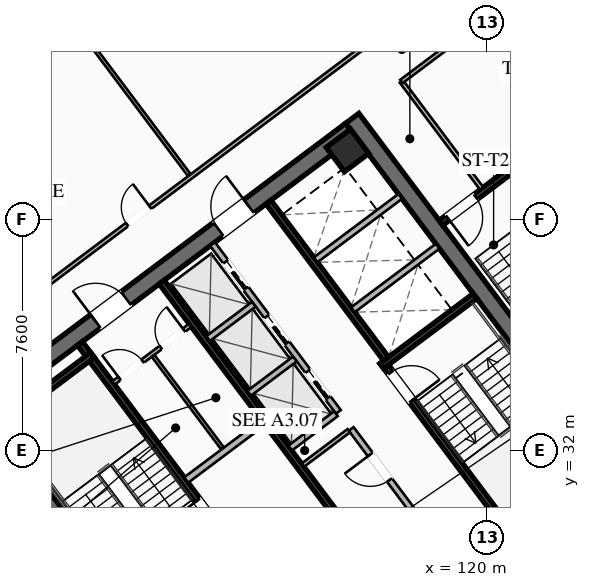
"""IFC4 building model, lengths in metres.
Left out: names, types, materials, properties, quantities, classifications, styles, units other than length and angle.
Written with IfcOpenShell. Run it as: python <this file> out.ifc"""

import sys

from ifc_helpers import new_model, si_unit, direction, frame, frame_2d, origin, origin_2d, place, context, subcontext, project, spatial, rectangle, hollow_rectangle, extrude, element, fill, save


model = new_model("IFC4")
c1 = context("Model", 3, precision=1e-05, world=origin(), true_north=direction((0.0, 1.0)))
c2 = subcontext(c1, "Body", "Model", "MODEL_VIEW")
j1 = project(units=[si_unit("LENGTHUNIT", "METRE"), si_unit("PLANEANGLEUNIT", "RADIAN")], contexts=[c1])
p1 = place(None, origin())
s1 = spatial("IfcSite", under=j1, at=p1, CompositionType="ELEMENT")
p2 = place(p1, origin())
s2 = spatial("IfcBuilding", under=s1, at=p2, CompositionType="ELEMENT")
p3 = place(p2, frame((0.0, 0.0, 125.05)))
s3 = spatial("IfcBuildingStorey", under=s2, at=p3, CompositionType="ELEMENT", Elevation=125.05)
for number, where, z_axis, x_axis in (
    (1, (112.436, 21.077, 0.0), (0.0, 0.0, 1.0), (-0.6, 0.8, 0.0)),
    (2, (115.564, 42.923, 0.0), (0.0, 0.0, 1.0), (0.6, -0.8, 0.0)),
):
    element("IfcWall", number, at=place(p3, frame(where, z_axis=z_axis, x_axis=x_axis)), inside=s3, PredefinedType="SHEAR", context=c2, shape_type="SweptSolid", body=[
        extrude(rectangle(XDim=15.6, YDim=0.55, at=frame_2d((7.8, 0.0))), origin(), (0.0, 0.0, 1.0), 3.55),
    ])
p4 = place(p3, frame((124.539, 30.498, 0.0), z_axis=(0.0, 0.0, 1.0), x_axis=(-0.799998054672, -0.600002593761, 0.0)))
e3 = element("IfcWall", 3, at=p4, inside=s3, PredefinedType="SHEAR", context=c2, shape_type="SweptSolid", body=[
    extrude(rectangle(XDim=15.06, YDim=0.55, at=frame_2d((7.53, 0.0))), origin(), (0.0, 0.0, 1.0), 3.55),
])
p5 = place(p4, frame((9.23, 0.0, 0.0)))
e4 = element("IfcOpeningElement", 4, at=p5, cuts=e3, PredefinedType="OPENING", context=c2, shape_type="SweptSolid", body=[
    extrude(rectangle(XDim=1.25, YDim=2.25, at=frame_2d((0.625, 1.125))), frame((0.0, 0.285, 0.0), z_axis=(0.0, -1.0, 0.0), x_axis=(1.0, 0.0, 0.0)), (0.0, 0.0, 1.0), 0.57),
])
p6 = place(p4, frame((4.18, 0.0, 0.0)))
e5 = element("IfcOpeningElement", 5, at=p6, cuts=e3, PredefinedType="OPENING", context=c2, shape_type="SweptSolid", body=[
    extrude(rectangle(XDim=1.25, YDim=2.25, at=frame_2d((0.625, 1.125))), frame((0.0, 0.285, 0.0), z_axis=(0.0, -1.0, 0.0), x_axis=(1.0, 0.0, 0.0)), (0.0, 0.0, 1.0), 0.57),
])
p7 = place(p3, frame((103.461, 33.502, 0.0), z_axis=(0.0, 0.0, 1.0), x_axis=(0.799998054672, 0.600002593761, 0.0)))
e6 = element("IfcWall", 6, at=p7, inside=s3, PredefinedType="SHEAR", context=c2, shape_type="SweptSolid", body=[
    extrude(rectangle(XDim=15.06, YDim=0.55, at=frame_2d((7.53, 0.0))), origin(), (0.0, 0.0, 1.0), 3.55),
])
p8 = place(p7, frame((4.58, 0.0, 0.0)))
e7 = element("IfcOpeningElement", 7, at=p8, cuts=e6, PredefinedType="OPENING", context=c2, shape_type="SweptSolid", body=[
    extrude(rectangle(XDim=1.25, YDim=2.25, at=frame_2d((0.625, 1.125))), frame((0.0, 0.285, 0.0), z_axis=(0.0, -1.0, 0.0), x_axis=(1.0, 0.0, 0.0)), (0.0, 0.0, 1.0), 0.57),
])
p9 = place(p7, frame((9.63, 0.0, 0.0)))
e8 = element("IfcOpeningElement", 8, at=p9, cuts=e6, PredefinedType="OPENING", context=c2, shape_type="SweptSolid", body=[
    extrude(rectangle(XDim=1.25, YDim=2.25, at=frame_2d((0.625, 1.125))), frame((0.0, 0.285, 0.0), z_axis=(0.0, -1.0, 0.0), x_axis=(1.0, 0.0, 0.0)), (0.0, 0.0, 1.0), 0.57),
])
p10 = place(p3, frame((115.41, 41.87, 0.0), z_axis=(0.0, 0.0, 1.0), x_axis=(0.799999996291, 0.600000004945, 0.0)))
e9 = element("IfcColumn", 9, at=p10, inside=s3, PredefinedType="COLUMN", context=c2, shape_type="SweptSolid", body=[
    extrude(hollow_rectangle(XDim=1.0, YDim=1.0, WallThickness=0.04, at=origin_2d()), origin(), (0.0, 0.0, 1.0), 3.37),
])
p11 = place(p3, frame((99.632, 44.074, 0.0), z_axis=(0.0, 0.0, 1.0), x_axis=(0.799986212866, 0.600018382406, 0.0)))
e10 = element("IfcWall", 10, at=p11, inside=s3, PredefinedType="SOLIDWALL", context=c2, shape_type="SweptSolid", body=[
    extrude(rectangle(XDim=8.5, YDim=0.28, at=frame_2d((4.25, 0.0))), origin(), (0.0, 0.0, 1.0), 3.37),
])
p12 = place(p11, frame((3.6, 0.0, 0.0)))
e11 = element("IfcOpeningElement", 11, at=p12, cuts=e10, PredefinedType="OPENING", context=c2, shape_type="SweptSolid", body=[
    extrude(rectangle(XDim=1.3, YDim=2.15, at=frame_2d((0.65, 1.075))), frame((0.0, 0.15, 0.0), z_axis=(0.0, -1.0, 0.0), x_axis=(1.0, 0.0, 0.0)), (0.0, 0.0, 1.0), 0.3),
])
p13 = place(p3, frame((111.44, 29.08, 0.0), z_axis=(0.0, 0.0, 1.0), x_axis=(-0.59999029481, 0.8000072788, 0.0)))
e12 = element("IfcWall", 12, at=p13, inside=s3, PredefinedType="SHEAR", context=c2, shape_type="SweptSolid", body=[
    extrude(rectangle(XDim=8.05, YDim=0.2, at=frame_2d((4.025, 0.0))), origin(), (0.0, 0.0, 1.0), 3.37),
])
p14 = place(p13, frame((0.45, 0.0, 0.0)))
e13 = element("IfcOpeningElement", 13, at=p14, cuts=e12, PredefinedType="OPENING", context=c2, shape_type="SweptSolid", body=[
    extrude(rectangle(XDim=1.15, YDim=2.2, at=frame_2d((0.575, 1.1))), frame((0.0, 0.11, 0.0), z_axis=(0.0, -1.0, 0.0), x_axis=(1.0, 0.0, 0.0)), (0.0, 0.0, 1.0), 0.22),
])
p15 = place(p3, frame((103.956, 32.842, 0.0), z_axis=(0.0, 0.0, 1.0), x_axis=(0.800015298837, 0.599979601008, 0.0)))
e14 = element("IfcWall", 14, at=p15, inside=s3, PredefinedType="SHEAR", context=c2, shape_type="SweptSolid", body=[
    extrude(rectangle(XDim=3.83, YDim=0.2, at=frame_2d((1.915, 0.0))), origin(), (0.0, 0.0, 1.0), 3.37),
])
p16 = place(p3, frame((116.56, 34.92, 0.0), z_axis=(0.0, 0.0, 1.0), x_axis=(0.59999029481, -0.8000072788, 0.0)))
e15 = element("IfcWall", 15, at=p16, inside=s3, PredefinedType="SHEAR", context=c2, shape_type="SweptSolid", body=[
    extrude(rectangle(XDim=8.05, YDim=0.2, at=frame_2d((4.025, 0.0))), origin(), (0.0, 0.0, 1.0), 3.37),
])
p17 = place(p16, frame((0.45, 0.0, 0.0)))
e16 = element("IfcOpeningElement", 16, at=p17, cuts=e15, PredefinedType="OPENING", context=c2, shape_type="SweptSolid", body=[
    extrude(rectangle(XDim=1.15, YDim=2.2, at=frame_2d((0.575, 1.1))), frame((0.0, 0.11, 0.0), z_axis=(0.0, -1.0, 0.0), x_axis=(1.0, 0.0, 0.0)), (0.0, 0.0, 1.0), 0.22),
])
p18 = place(p3, frame((116.54, 34.78, 0.0), z_axis=(0.0, 0.0, 1.0), x_axis=(0.800015298837, 0.599979601008, 0.0)))
e17 = element("IfcWall", 17, at=p18, inside=s3, PredefinedType="SHEAR", context=c2, shape_type="SweptSolid", body=[
    extrude(rectangle(XDim=3.83, YDim=0.2, at=frame_2d((1.915, 0.0))), origin(), (0.0, 0.0, 1.0), 3.37),
])
p19 = place(p3, frame((117.998, 25.936, 0.0), z_axis=(0.0, 0.0, 1.0), x_axis=(-0.600002693989, 0.799997979501, 0.0)))
e18 = element("IfcWall", 18, at=p19, inside=s3, PredefinedType="SHEAR", context=c2, shape_type="SweptSolid", body=[
    extrude(rectangle(XDim=14.5, YDim=0.2, at=frame_2d((7.25, 0.0))), origin(), (0.0, 0.0, 1.0), 3.37),
])
p20 = place(p3, frame((110.104, 31.028, 0.0), z_axis=(0.0, 0.0, 1.0), x_axis=(0.800018601094, 0.59997519774, 0.0)))
e19 = element("IfcWall", 19, at=p20, inside=s3, PredefinedType="SOLIDWALL", context=c2, shape_type="SweptSolid", body=[
    extrude(rectangle(XDim=3.15, YDim=0.22, at=frame_2d((1.575, 0.0))), origin(), (0.0, 0.0, 1.0), 2.723),
])
p21 = place(p3, frame((112.81, 40.17, 0.0), z_axis=(0.0, 0.0, 1.0), x_axis=(0.599993943644, -0.800004542231, 0.0)))
e20 = element("IfcWall", 20, at=p21, inside=s3, PredefinedType="SHEAR", context=c2, shape_type="SweptSolid", body=[
    extrude(rectangle(XDim=6.45, YDim=0.2, at=frame_2d((3.225, 0.0))), origin(), (0.0, 0.0, 1.0), 3.37),
])
for number, where, z_axis, x_axis in (
    (21, (115.59, 36.63, 0.0), (0.0, 0.0, 1.0), (0.8, 0.6, 0.0)),
    (22, (114.36, 38.27, 0.0), (0.0, 0.0, 1.0), (0.8, 0.6, 0.0)),
):
    element("IfcWall", number, at=place(p3, frame(where, z_axis=z_axis, x_axis=x_axis)), inside=s3, PredefinedType="SOLIDWALL", context=c2, shape_type="SweptSolid", body=[
        extrude(rectangle(XDim=3.48, YDim=0.2, at=frame_2d((1.74, 0.0))), origin(), (0.0, 0.0, 1.0), 3.37),
    ])
p22 = place(p3, frame((107.71, 34.22, 0.0), z_axis=(0.0, 0.0, 1.0), x_axis=(0.799981399002, 0.60002480053, 0.0)))
e23 = element("IfcWall", 23, at=p22, inside=s3, PredefinedType="PARTITIONING", context=c2, shape_type="SweptSolid", body=[
    extrude(rectangle(XDim=3.15, YDim=0.135, at=frame_2d((1.575, 0.0))), origin(), (0.0, 0.0, 1.0), 2.723),
])
p23 = place(p22, frame((0.25, 0.0, 0.0)))
e24 = element("IfcOpeningElement", 24, at=p23, cuts=e23, PredefinedType="OPENING", context=c2, shape_type="SweptSolid", body=[
    extrude(rectangle(XDim=0.95, YDim=2.05, at=frame_2d((0.475, 1.025))), frame((0.0, 0.077, 0.0), z_axis=(0.0, -1.0, 0.0), x_axis=(1.0, 0.0, 0.0)), (0.0, 0.0, 1.0), 0.155),
])
p24 = place(p22, frame((1.95, 0.0, 0.0)))
e25 = element("IfcOpeningElement", 25, at=p24, cuts=e23, PredefinedType="OPENING", context=c2, shape_type="SweptSolid", body=[
    extrude(rectangle(XDim=0.95, YDim=2.05, at=frame_2d((0.475, 1.025))), frame((0.0, 0.077, 0.0), z_axis=(0.0, -1.0, 0.0), x_axis=(1.0, 0.0, 0.0)), (0.0, 0.0, 1.0), 0.155),
])
p25 = place(p3, frame((111.296, 32.072, 0.0), z_axis=(0.0, 0.0, 1.0), x_axis=(-0.59995887973, 0.800030838552, 0.0)))
e26 = element("IfcWall", 26, at=p25, inside=s3, PredefinedType="PARTITIONING", context=c2, shape_type="SweptSolid", body=[
    extrude(rectangle(XDim=3.8, YDim=0.11, at=frame_2d((1.9, 0.0))), origin(), (0.0, 0.0, 1.0), 2.723),
])
p26 = place(p3, frame((119.67, 27.19, 0.0), z_axis=(0.0, 0.0, 1.0), x_axis=(-0.599988677396, 0.800008491828, 0.0)))
e27 = element("IfcWall", 27, at=p26, inside=s3, PredefinedType="SOLIDWALL", context=c2, shape_type="SweptSolid", body=[
    extrude(rectangle(XDim=6.9, YDim=0.2, at=frame_2d((3.45, 0.0))), origin(), (0.0, 0.0, 1.0), 2.723),
])
p27 = place(p26, frame((0.85, 0.0, 0.0)))
e28 = element("IfcOpeningElement", 28, at=p27, cuts=e27, PredefinedType="OPENING", context=c2, shape_type="SweptSolid", body=[
    extrude(rectangle(XDim=0.95, YDim=2.05, at=frame_2d((0.475, 1.025))), frame((0.0, 0.11, 0.0), z_axis=(0.0, -1.0, 0.0), x_axis=(1.0, 0.0, 0.0)), (0.0, 0.0, 1.0), 0.22),
])
p28 = place(p26, frame((4.8, 0.0, 0.0)))
e29 = element("IfcOpeningElement", 29, at=p28, cuts=e27, PredefinedType="OPENING", context=c2, shape_type="SweptSolid", body=[
    extrude(rectangle(XDim=1.05, YDim=2.2, at=frame_2d((0.525, 1.1))), frame((0.0, 0.11, 0.0), z_axis=(0.0, -1.0, 0.0), x_axis=(1.0, 0.0, 0.0)), (0.0, 0.0, 1.0), 0.22),
])
p29 = place(p3, frame((113.946, 31.522, 0.0), z_axis=(0.0, 0.0, 1.0), x_axis=(0.8, 0.6, 0.0)))
e30 = element("IfcWall", 30, at=p29, inside=s3, PredefinedType="PARTITIONING", context=c2, shape_type="SweptSolid", body=[
    extrude(rectangle(XDim=1.88, YDim=0.135, at=frame_2d((0.94, 0.0))), origin(), (0.0, 0.0, 1.0), 2.723),
])
p30 = place(p3, frame((115.11, 33.27, 0.0), z_axis=(0.0, 0.0, 1.0), x_axis=(-0.600011322243, 0.799991508192, 0.0)))
e31 = element("IfcWall", 31, at=p30, inside=s3, PredefinedType="SOLIDWALL", context=c2, shape_type="SweptSolid", body=[
    extrude(rectangle(XDim=6.9, YDim=0.2, at=frame_2d((3.45, 0.0))), origin(), (0.0, 0.0, 1.0), 3.37),
])
p31 = place(p30, frame((0.575, 0.0, 0.0)))
e32 = element("IfcOpeningElement", 32, at=p31, cuts=e31, PredefinedType="OPENING", context=c2, shape_type="SweptSolid", body=[
    extrude(rectangle(XDim=1.1, YDim=2.2, at=frame_2d((0.55, 1.1))), frame((0.0, 0.11, 0.0), z_axis=(0.0, -1.0, 0.0), x_axis=(1.0, 0.0, 0.0)), (0.0, 0.0, 1.0), 0.22),
])
p32 = place(p30, frame((2.825, 0.0, 0.0)))
e33 = element("IfcOpeningElement", 33, at=p32, cuts=e31, PredefinedType="OPENING", context=c2, shape_type="SweptSolid", body=[
    extrude(rectangle(XDim=1.1, YDim=2.2, at=frame_2d((0.55, 1.1))), frame((0.0, 0.11, 0.0), z_axis=(0.0, -1.0, 0.0), x_axis=(1.0, 0.0, 0.0)), (0.0, 0.0, 1.0), 0.22),
])
p33 = place(p30, frame((5.075, 0.0, 0.0)))
e34 = element("IfcOpeningElement", 34, at=p33, cuts=e31, PredefinedType="OPENING", context=c2, shape_type="SweptSolid", body=[
    extrude(rectangle(XDim=1.1, YDim=2.2, at=frame_2d((0.55, 1.1))), frame((0.0, 0.11, 0.0), z_axis=(0.0, -1.0, 0.0), x_axis=(1.0, 0.0, 0.0)), (0.0, 0.0, 1.0), 0.22),
])
p34 = place(p3, frame((113.526, 32.082, 0.0), z_axis=(0.0, 0.0, 1.0), x_axis=(0.800046745961, 0.599937666993, 0.0)))
e35 = element("IfcWall", 35, at=p34, inside=s3, PredefinedType="SOLIDWALL", context=c2, shape_type="SweptSolid", body=[
    extrude(rectangle(XDim=1.88, YDim=0.2, at=frame_2d((0.94, 0.0))), origin(), (0.0, 0.0, 1.0), 3.37),
])
p35 = place(p3, frame((112.176, 33.882, 0.0), z_axis=(0.0, 0.0, 1.0), x_axis=(0.8, 0.6, 0.0)))
e36 = element("IfcWall", 36, at=p35, inside=s3, PredefinedType="SOLIDWALL", context=c2, shape_type="SweptSolid", body=[
    extrude(rectangle(XDim=1.88, YDim=0.2, at=frame_2d((0.94, 0.0))), origin(), (0.0, 0.0, 1.0), 3.37),
])
p36 = place(p3, frame((110.826, 35.682, 0.0), z_axis=(0.0, 0.0, 1.0), x_axis=(0.799984418148, 0.600020775241, 0.0)))
e37 = element("IfcWall", 37, at=p36, inside=s3, PredefinedType="SOLIDWALL", context=c2, shape_type="SweptSolid", body=[
    extrude(rectangle(XDim=1.88, YDim=0.2, at=frame_2d((0.94, 0.0))), origin(), (0.0, 0.0, 1.0), 3.37),
])
p37 = place(p3, frame((121.204, 41.528, 0.0), z_axis=(0.0, 0.0, 1.0), x_axis=(-0.800017232136, -0.599977023131, 0.0)))
e38 = element("IfcWall", 38, at=p37, inside=s3, PredefinedType="SHEAR", context=c2, shape_type="SweptSolid", body=[
    extrude(rectangle(XDim=3.4, YDim=0.2, at=frame_2d((1.7, 0.0))), origin(), (0.0, 0.0, 1.0), 3.37),
])
p38 = place(p37, frame((1.975, 0.0, 0.0)))
e39 = element("IfcOpeningElement", 39, at=p38, cuts=e38, PredefinedType="OPENING", context=c2, shape_type="SweptSolid", body=[
    extrude(rectangle(XDim=1.15, YDim=2.2, at=frame_2d((0.575, 1.1))), frame((0.0, 0.11, 0.0), z_axis=(0.0, -1.0, 0.0), x_axis=(1.0, 0.0, 0.0)), (0.0, 0.0, 1.0), 0.22),
])
p39 = place(p3, frame((119.824, 40.618, 0.0), z_axis=(0.0, 0.0, 1.0), x_axis=(-0.599982243973, 0.800013316712, 0.0)))
e40 = element("IfcWall", 40, at=p39, inside=s3, PredefinedType="PARTITIONING", context=c2, shape_type="SweptSolid", body=[
    extrude(rectangle(XDim=4.4, YDim=0.135, at=frame_2d((2.2, 0.0))), origin(), (0.0, 0.0, 1.0), 2.723),
])
p40 = place(p3, frame((95.81, 30.17, 0.0), z_axis=(0.0, 0.0, 1.0), x_axis=(0.8, 0.6, 0.0)))
e41 = element("IfcWall", 41, at=p40, inside=s3, PredefinedType="PARTITIONING", context=c2, shape_type="SweptSolid", body=[
    extrude(rectangle(XDim=31.3, YDim=0.135, at=frame_2d((15.65, 0.0))), origin(), (0.0, 0.0, 1.0), 2.723),
])
p41 = place(p40, frame((0.3, 0.0, 0.0)))
e42 = element("IfcOpeningElement", 42, at=p41, cuts=e41, PredefinedType="OPENING", context=c2, shape_type="SweptSolid", body=[
    extrude(rectangle(XDim=0.95, YDim=2.05, at=frame_2d((0.475, 1.025))), frame((0.0, 0.077, 0.0), z_axis=(0.0, -1.0, 0.0), x_axis=(1.0, 0.0, 0.0)), (0.0, 0.0, 1.0), 0.155),
])
p42 = place(p40, frame((15.438, 0.0, 0.0)))
e43 = element("IfcOpeningElement", 43, at=p42, cuts=e41, PredefinedType="OPENING", context=c2, shape_type="SweptSolid", body=[
    extrude(rectangle(XDim=0.95, YDim=2.05, at=frame_2d((0.475, 1.025))), frame((0.0, 0.077, 0.0), z_axis=(0.0, -1.0, 0.0), x_axis=(1.0, 0.0, 0.0)), (0.0, 0.0, 1.0), 0.155),
])
p43 = place(p40, frame((30.05, 0.0, 0.0)))
e44 = element("IfcOpeningElement", 44, at=p43, cuts=e41, PredefinedType="OPENING", context=c2, shape_type="SweptSolid", body=[
    extrude(rectangle(XDim=0.95, YDim=2.05, at=frame_2d((0.475, 1.025))), frame((0.0, 0.077, 0.0), z_axis=(0.0, -1.0, 0.0), x_axis=(1.0, 0.0, 0.0)), (0.0, 0.0, 1.0), 0.155),
])
p44 = place(p3, frame((110.202, 41.064, 0.0), z_axis=(0.0, 0.0, 1.0), x_axis=(-0.599986373537, 0.800010219666, 0.0)))
e45 = element("IfcWall", 45, at=p44, inside=s3, PredefinedType="PARTITIONING", context=c2, shape_type="SweptSolid", body=[
    extrude(rectangle(XDim=8.6, YDim=0.11, at=frame_2d((4.3, 0.0))), origin(), (0.0, 0.0, 1.0), 2.723),
])
p45 = place(p3, frame((133.012, 32.734, 0.0), z_axis=(0.0, 0.0, 1.0), x_axis=(-0.800003744006, -0.59999500796, 0.0)))
e46 = element("IfcWall", 46, at=p45, inside=s3, PredefinedType="PARTITIONING", context=c2, shape_type="SweptSolid", body=[
    extrude(rectangle(XDim=31.3, YDim=0.135, at=frame_2d((15.65, 0.0))), origin(), (0.0, 0.0, 1.0), 2.723),
])
p46 = place(p45, frame((29.97, 0.0, 0.0)))
e47 = element("IfcOpeningElement", 47, at=p46, cuts=e46, PredefinedType="OPENING", context=c2, shape_type="SweptSolid", body=[
    extrude(rectangle(XDim=0.95, YDim=2.05, at=frame_2d((0.475, 1.025))), frame((0.0, 0.077, 0.0), z_axis=(0.0, -1.0, 0.0), x_axis=(1.0, 0.0, 0.0)), (0.0, 0.0, 1.0), 0.155),
])
p47 = place(p45, frame((14.938, 0.0, 0.0)))
e48 = element("IfcOpeningElement", 48, at=p47, cuts=e46, PredefinedType="OPENING", context=c2, shape_type="SweptSolid", body=[
    extrude(rectangle(XDim=0.95, YDim=2.05, at=frame_2d((0.475, 1.025))), frame((0.0, 0.077, 0.0), z_axis=(0.0, -1.0, 0.0), x_axis=(1.0, 0.0, 0.0)), (0.0, 0.0, 1.0), 0.155),
])
p48 = place(p45, frame((0.38, 0.0, 0.0)))
e49 = element("IfcOpeningElement", 49, at=p48, cuts=e46, PredefinedType="OPENING", context=c2, shape_type="SweptSolid", body=[
    extrude(rectangle(XDim=0.95, YDim=2.05, at=frame_2d((0.475, 1.025))), frame((0.0, 0.077, 0.0), z_axis=(0.0, -1.0, 0.0), x_axis=(1.0, 0.0, 0.0)), (0.0, 0.0, 1.0), 0.155),
])
p49 = place(p3, frame((123.944, 49.208, 0.0), z_axis=(0.0, 0.0, 1.0), x_axis=(-0.799996532921, -0.600004622744, 0.0)))
e50 = element("IfcWall", 50, at=p49, inside=s3, PredefinedType="PARTITIONING", context=c2, shape_type="SweptSolid", body=[
    extrude(rectangle(XDim=8.45, YDim=0.135, at=frame_2d((4.225, 0.0))), origin(), (0.0, 0.0, 1.0), 2.723),
])
p50 = place(p49, frame((4.1, 0.0, 0.0)))
e51 = element("IfcOpeningElement", 51, at=p50, cuts=e50, PredefinedType="OPENING", context=c2, shape_type="SweptSolid", body=[
    extrude(rectangle(XDim=0.95, YDim=2.05, at=frame_2d((0.475, 1.025))), frame((0.0, 0.077, 0.0), z_axis=(0.0, -1.0, 0.0), x_axis=(1.0, 0.0, 0.0)), (0.0, 0.0, 1.0), 0.155),
])
p51 = place(p3, frame((112.104, 20.928, 0.0), z_axis=(0.0, 0.0, 1.0), x_axis=(-0.599994940075, 0.800003794918, 0.0)))
e52 = element("IfcWall", 52, at=p51, inside=s3, PredefinedType="PARTITIONING", context=c2, shape_type="SweptSolid", body=[
    extrude(rectangle(XDim=15.44, YDim=0.135, at=frame_2d((7.72, 0.0))), origin(), (0.0, 0.0, 1.0), 2.723),
])
p52 = place(p8, origin())
e53 = element("IfcDoor", 53, at=p52, inside=s3, OperationType="SINGLE_SWING_LEFT", PredefinedType="DOOR", context=c2, shape_type="SweptSolid", body=[
    extrude(rectangle(XDim=1.25, YDim=2.25, at=frame_2d((0.625, 1.125))), frame((0.0, 0.025, 0.0), z_axis=(0.0, -1.0, 0.0), x_axis=(1.0, 0.0, 0.0)), (0.0, 0.0, 1.0), 0.05),
])
fill(e7, e53)
p53 = place(p9, origin())
e54 = element("IfcDoor", 54, at=p53, inside=s3, OperationType="SINGLE_SWING_RIGHT", PredefinedType="DOOR", context=c2, shape_type="SweptSolid", body=[
    extrude(rectangle(XDim=1.25, YDim=2.25, at=frame_2d((0.625, 1.125))), frame((0.0, 0.025, 0.0), z_axis=(0.0, -1.0, 0.0), x_axis=(1.0, 0.0, 0.0)), (0.0, 0.0, 1.0), 0.05),
])
fill(e8, e54)
p54 = place(p14, origin())
e55 = element("IfcDoor", 55, at=p54, inside=s3, OperationType="SINGLE_SWING_RIGHT", PredefinedType="DOOR", context=c2, shape_type="SweptSolid", body=[
    extrude(rectangle(XDim=1.15, YDim=2.2, at=frame_2d((0.575, 1.1))), frame((0.0, 0.025, 0.0), z_axis=(0.0, -1.0, 0.0), x_axis=(1.0, 0.0, 0.0)), (0.0, 0.0, 1.0), 0.05),
])
fill(e13, e55)
p55 = place(p17, origin())
e56 = element("IfcDoor", 56, at=p55, inside=s3, OperationType="SINGLE_SWING_RIGHT", PredefinedType="DOOR", context=c2, shape_type="SweptSolid", body=[
    extrude(rectangle(XDim=1.15, YDim=2.2, at=frame_2d((0.575, 1.1))), frame((0.0, 0.025, 0.0), z_axis=(0.0, -1.0, 0.0), x_axis=(1.0, 0.0, 0.0)), (0.0, 0.0, 1.0), 0.05),
])
fill(e16, e56)
p56 = place(p23, origin())
e57 = element("IfcDoor", 57, at=p56, inside=s3, OperationType="SINGLE_SWING_LEFT", PredefinedType="DOOR", context=c2, shape_type="SweptSolid", body=[
    extrude(rectangle(XDim=0.95, YDim=2.05, at=frame_2d((0.475, 1.025))), frame((0.0, 0.025, 0.0), z_axis=(0.0, -1.0, 0.0), x_axis=(1.0, 0.0, 0.0)), (0.0, 0.0, 1.0), 0.05),
])
fill(e24, e57)
p57 = place(p24, origin())
e58 = element("IfcDoor", 58, at=p57, inside=s3, OperationType="SINGLE_SWING_RIGHT", PredefinedType="DOOR", context=c2, shape_type="SweptSolid", body=[
    extrude(rectangle(XDim=0.95, YDim=2.05, at=frame_2d((0.475, 1.025))), frame((0.0, 0.025, 0.0), z_axis=(0.0, -1.0, 0.0), x_axis=(1.0, 0.0, 0.0)), (0.0, 0.0, 1.0), 0.05),
])
fill(e25, e58)
p58 = place(p28, origin())
e59 = element("IfcDoor", 59, at=p58, inside=s3, OperationType="SINGLE_SWING_RIGHT", PredefinedType="DOOR", context=c2, shape_type="SweptSolid", body=[
    extrude(rectangle(XDim=1.05, YDim=2.2, at=frame_2d((0.525, 1.1))), frame((0.0, 0.025, 0.0), z_axis=(0.0, -1.0, 0.0), x_axis=(1.0, 0.0, 0.0)), (0.0, 0.0, 1.0), 0.05),
])
fill(e29, e59)
p59 = place(p38, origin())
e60 = element("IfcDoor", 60, at=p59, inside=s3, OperationType="SINGLE_SWING_RIGHT", PredefinedType="DOOR", context=c2, shape_type="SweptSolid", body=[
    extrude(rectangle(XDim=1.15, YDim=2.2, at=frame_2d((0.575, 1.1))), frame((0.0, 0.025, 0.0), z_axis=(0.0, -1.0, 0.0), x_axis=(1.0, 0.0, 0.0)), (0.0, 0.0, 1.0), 0.05),
])
fill(e39, e60)
p60 = place(p42, origin())
e61 = element("IfcDoor", 61, at=p60, inside=s3, OperationType="SINGLE_SWING_RIGHT", PredefinedType="DOOR", context=c2, shape_type="SweptSolid", body=[
    extrude(rectangle(XDim=0.95, YDim=2.05, at=frame_2d((0.475, 1.025))), frame((0.0, 0.025, 0.0), z_axis=(0.0, -1.0, 0.0), x_axis=(1.0, 0.0, 0.0)), (0.0, 0.0, 1.0), 0.05),
])
fill(e43, e61)
p61 = place(p31, origin())
e62 = element("IfcDoor", 62, at=p61, inside=s3, OperationType="SLIDING_TO_LEFT", PredefinedType="DOOR", context=c2, shape_type="SweptSolid", body=[
    extrude(rectangle(XDim=1.1, YDim=2.2, at=frame_2d((0.55, 1.1))), frame((0.0, 0.025, 0.0), z_axis=(0.0, -1.0, 0.0), x_axis=(1.0, 0.0, 0.0)), (0.0, 0.0, 1.0), 0.05),
])
fill(e32, e62)
p62 = place(p32, origin())
e63 = element("IfcDoor", 63, at=p62, inside=s3, OperationType="SLIDING_TO_LEFT", PredefinedType="DOOR", context=c2, shape_type="SweptSolid", body=[
    extrude(rectangle(XDim=1.1, YDim=2.2, at=frame_2d((0.55, 1.1))), frame((0.0, 0.025, 0.0), z_axis=(0.0, -1.0, 0.0), x_axis=(1.0, 0.0, 0.0)), (0.0, 0.0, 1.0), 0.05),
])
fill(e33, e63)
p63 = place(p33, origin())
e64 = element("IfcDoor", 64, at=p63, inside=s3, OperationType="SLIDING_TO_LEFT", PredefinedType="DOOR", context=c2, shape_type="SweptSolid", body=[
    extrude(rectangle(XDim=1.1, YDim=2.2, at=frame_2d((0.55, 1.1))), frame((0.0, 0.025, 0.0), z_axis=(0.0, -1.0, 0.0), x_axis=(1.0, 0.0, 0.0)), (0.0, 0.0, 1.0), 0.05),
])
fill(e34, e64)
save(model, sys.argv[1])
